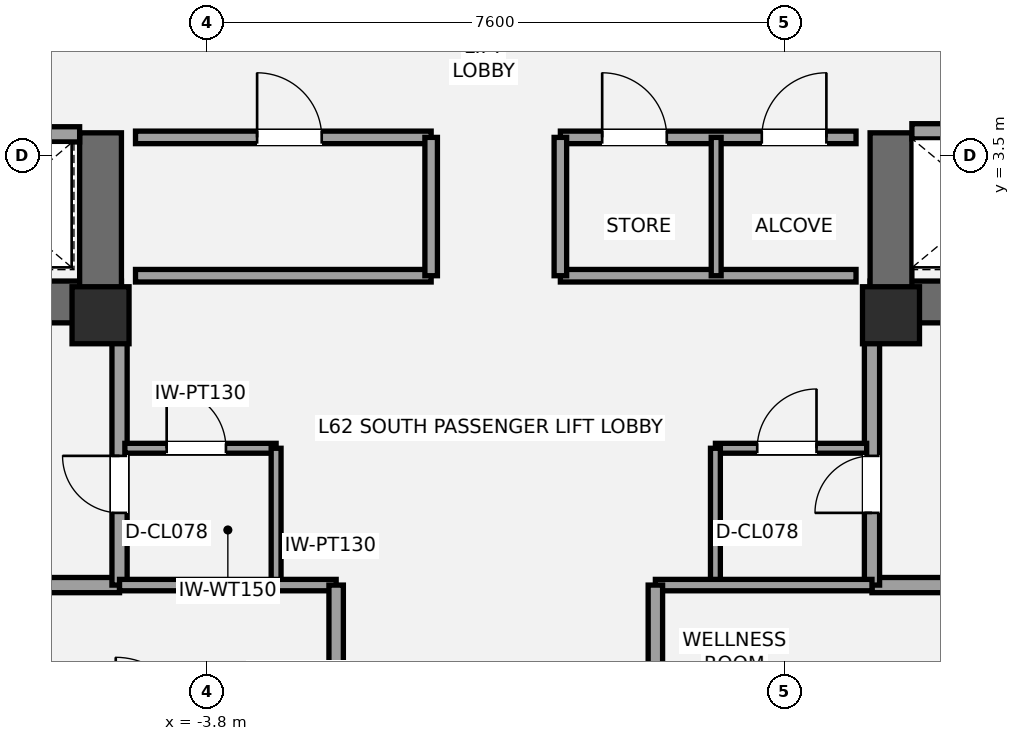
"""IFC4 building model, lengths in metres.
Left out: names, types, materials, properties, quantities, classifications, styles, units other than length and angle.
Written with IfcOpenShell. Run it as: python <this file> out.ifc"""

import sys

from ifc_helpers import new_model, si_unit, direction, frame, frame_2d, origin, origin_2d, place, context, subcontext, project, spatial, rectangle, extrude, element, fill, save


model = new_model("IFC4")
c1 = context("Model", 3, precision=1e-05, world=origin(), true_north=direction((0.0, 1.0)))
c2 = subcontext(c1, "Body", "Model", "MODEL_VIEW")
j1 = project(units=[si_unit("LENGTHUNIT", "METRE"), si_unit("PLANEANGLEUNIT", "RADIAN")], contexts=[c1])
p1 = place(None, origin())
s1 = spatial("IfcSite", under=j1, at=p1, CompositionType="ELEMENT")
p2 = place(p1, origin())
s2 = spatial("IfcBuilding", under=s1, at=p2, CompositionType="ELEMENT")
p3 = place(p2, frame((0.0, 0.0, 222.6)))
s3 = spatial("IfcBuildingStorey", under=s2, at=p3, CompositionType="ELEMENT", Elevation=222.6)
p4 = place(p3, frame((-4.925, 1.575, 0.0), z_axis=(0.0, 0.0, 1.0), x_axis=(-1.0, 0.0, 0.0)))
e1 = element("IfcWall", 1, at=p4, inside=s3, PredefinedType="SHEAR", context=c2, shape_type="SweptSolid", body=[
    extrude(rectangle(XDim=8.775, YDim=0.55, at=frame_2d((4.387, 0.0))), origin(), (0.0, 0.0, 1.0), 3.15),
])
p5 = place(p4, frame((5.375, 0.0, 0.0)))
e2 = element("IfcOpeningElement", 2, at=p5, cuts=e1, PredefinedType="OPENING", context=c2, shape_type="SweptSolid", body=[
    extrude(rectangle(XDim=1.05, YDim=2.15, at=frame_2d((0.525, 1.075))), frame((0.0, 0.285, 0.0), z_axis=(0.0, -1.0, 0.0), x_axis=(1.0, 0.0, 0.0)), (0.0, 0.0, 1.0), 0.57),
])
p6 = place(p4, frame((3.705, 0.0, 0.0)))
e3 = element("IfcOpeningElement", 3, at=p6, cuts=e1, PredefinedType="OPENING", context=c2, shape_type="SweptSolid", body=[
    extrude(rectangle(XDim=1.1, YDim=2.2, at=frame_2d((0.55, 1.1))), frame((0.0, 0.285, 0.0), z_axis=(0.0, -1.0, 0.0), x_axis=(1.0, 0.0, 0.0)), (0.0, 0.0, 1.0), 0.57),
])
p7 = place(p3, frame((-5.2, 1.3, 0.0), z_axis=(0.0, 0.0, 1.0), x_axis=(0.0, 1.0, 0.0)))
e4 = element("IfcWall", 4, at=p7, inside=s3, PredefinedType="SHEAR", context=c2, shape_type="SweptSolid", body=[
    extrude(rectangle(XDim=2.5, YDim=0.55, at=frame_2d((1.25, 0.0))), origin(), (0.0, 0.0, 1.0), 3.15),
])
p8 = place(p3, frame((13.7, 1.575, 0.0), z_axis=(0.0, 0.0, 1.0), x_axis=(-1.0, 0.0, 0.0)))
e5 = element("IfcWall", 5, at=p8, inside=s3, PredefinedType="SHEAR", context=c2, shape_type="SweptSolid", body=[
    extrude(rectangle(XDim=8.775, YDim=0.55, at=frame_2d((4.387, 0.0))), origin(), (0.0, 0.0, 1.0), 3.15),
])
p9 = place(p8, frame((2.35, 0.0, 0.0)))
e6 = element("IfcOpeningElement", 6, at=p9, cuts=e5, PredefinedType="OPENING", context=c2, shape_type="SweptSolid", body=[
    extrude(rectangle(XDim=1.05, YDim=2.15, at=frame_2d((0.525, 1.075))), frame((0.0, 0.285, 0.0), z_axis=(0.0, -1.0, 0.0), x_axis=(1.0, 0.0, 0.0)), (0.0, 0.0, 1.0), 0.57),
])
p10 = place(p8, frame((4.35, 0.0, 0.0)))
e7 = element("IfcOpeningElement", 7, at=p10, cuts=e5, PredefinedType="OPENING", context=c2, shape_type="SweptSolid", body=[
    extrude(rectangle(XDim=1.1, YDim=2.2, at=frame_2d((0.55, 1.1))), frame((0.0, 0.285, 0.0), z_axis=(0.0, -1.0, 0.0), x_axis=(1.0, 0.0, 0.0)), (0.0, 0.0, 1.0), 0.57),
])
p11 = place(p3, frame((5.2, 1.3, 0.0), z_axis=(0.0, 0.0, 1.0), x_axis=(0.0, 1.0, 0.0)))
e8 = element("IfcWall", 8, at=p11, inside=s3, PredefinedType="SHEAR", context=c2, shape_type="SweptSolid", body=[
    extrude(rectangle(XDim=2.5, YDim=0.55, at=frame_2d((1.25, 0.0))), origin(), (0.0, 0.0, 1.0), 3.15),
])
for number, where, z_axis, x_axis in (
    (9, (-5.2, 1.4, 0.0), (0.0, 0.0, 1.0), (1.0, 0.0, 0.0)),
    (10, (5.2, 1.4, 0.0), (0.0, 0.0, 1.0), (1.0, 0.0, 0.0)),
):
    element("IfcColumn", number, at=place(p3, frame(where, z_axis=z_axis, x_axis=x_axis)), inside=s3, PredefinedType="PILASTER", context=c2, shape_type="SweptSolid", body=[
        extrude(rectangle(XDim=0.75, YDim=0.75, at=origin_2d()), origin(), (0.0, 0.0, 1.0), 3.15),
    ])
p12 = place(p3, frame((-7.2, -2.15, 0.0), z_axis=(0.0, 0.0, 1.0), x_axis=(1.0, 0.0, 0.0)))
e11 = element("IfcWall", 11, at=p12, inside=s3, PredefinedType="SOLIDWALL", context=c2, shape_type="SweptSolid", body=[
    extrude(rectangle(XDim=2.25, YDim=0.2, at=frame_2d((1.125, 0.0))), origin(), (0.0, 0.0, 1.0), 2.97),
])
p13 = place(p3, frame((-4.95, -2.15, 0.0), z_axis=(0.0, 0.0, 1.0), x_axis=(0.0, 1.0, 0.0)))
e12 = element("IfcWall", 12, at=p13, inside=s3, PredefinedType="SOLIDWALL", context=c2, shape_type="SweptSolid", body=[
    extrude(rectangle(XDim=3.5, YDim=0.2, at=frame_2d((1.75, 0.0))), origin(), (0.0, 0.0, 1.0), 2.423),
])
p14 = place(p13, frame((0.95, 0.0, 0.0)))
e13 = element("IfcOpeningElement", 13, at=p14, cuts=e12, PredefinedType="OPENING", context=c2, shape_type="SweptSolid", body=[
    extrude(rectangle(XDim=0.75, YDim=2.1, at=frame_2d((0.375, 1.05))), frame((0.0, 0.11, 0.0), z_axis=(0.0, -1.0, 0.0), x_axis=(1.0, 0.0, 0.0)), (0.0, 0.0, 1.0), 0.22),
])
p15 = place(p3, frame((4.95, -2.15, 0.0), z_axis=(0.0, 0.0, 1.0), x_axis=(1.0, 0.0, 0.0)))
e14 = element("IfcWall", 14, at=p15, inside=s3, PredefinedType="SOLIDWALL", context=c2, shape_type="SweptSolid", body=[
    extrude(rectangle(XDim=2.25, YDim=0.2, at=frame_2d((1.125, 0.0))), origin(), (0.0, 0.0, 1.0), 2.97),
])
p16 = place(p3, frame((4.95, -2.15, 0.0), z_axis=(0.0, 0.0, 1.0), x_axis=(0.0, 1.0, 0.0)))
e15 = element("IfcWall", 15, at=p16, inside=s3, PredefinedType="SOLIDWALL", context=c2, shape_type="SweptSolid", body=[
    extrude(rectangle(XDim=3.5, YDim=0.2, at=frame_2d((1.75, 0.0))), origin(), (0.0, 0.0, 1.0), 2.423),
])
p17 = place(p16, frame((0.95, 0.0, 0.0)))
e16 = element("IfcOpeningElement", 16, at=p17, cuts=e15, PredefinedType="OPENING", context=c2, shape_type="SweptSolid", body=[
    extrude(rectangle(XDim=0.75, YDim=2.1, at=frame_2d((0.375, 1.05))), frame((0.0, 0.11, 0.0), z_axis=(0.0, -1.0, 0.0), x_axis=(1.0, 0.0, 0.0)), (0.0, 0.0, 1.0), 0.22),
])
p18 = place(p3, frame((-4.88, -0.35, 0.0), z_axis=(0.0, 0.0, 1.0), x_axis=(1.0, 0.0, 0.0)))
e17 = element("IfcWall", 17, at=p18, inside=s3, PredefinedType="PARTITIONING", context=c2, shape_type="SweptSolid", body=[
    extrude(rectangle(XDim=1.99, YDim=0.13, at=frame_2d((0.995, 0.0))), origin(), (0.0, 0.0, 1.0), 2.97),
])
p19 = place(p18, frame((0.55, 0.0, 0.0)))
e18 = element("IfcOpeningElement", 18, at=p19, cuts=e17, PredefinedType="OPENING", context=c2, shape_type="SweptSolid", body=[
    extrude(rectangle(XDim=0.78, YDim=2.1, at=frame_2d((0.39, 1.05))), frame((0.0, 0.075, 0.0), z_axis=(0.0, -1.0, 0.0), x_axis=(1.0, 0.0, 0.0)), (0.0, 0.0, 1.0), 0.15),
])
p20 = place(p3, frame((-2.89, -2.15, 0.0), z_axis=(0.0, 0.0, 1.0), x_axis=(0.0, 1.0, 0.0)))
e19 = element("IfcWall", 19, at=p20, inside=s3, PredefinedType="PARTITIONING", context=c2, shape_type="SweptSolid", body=[
    extrude(rectangle(XDim=1.8, YDim=0.13, at=frame_2d((0.9, 0.0))), origin(), (0.0, 0.0, 1.0), 2.423),
])
p21 = place(p3, frame((2.89, -0.35, 0.0), z_axis=(0.0, 0.0, 1.0), x_axis=(1.0, 0.0, 0.0)))
e20 = element("IfcWall", 20, at=p21, inside=s3, PredefinedType="PARTITIONING", context=c2, shape_type="SweptSolid", body=[
    extrude(rectangle(XDim=1.99, YDim=0.13, at=frame_2d((0.995, 0.0))), origin(), (0.0, 0.0, 1.0), 2.423),
])
p22 = place(p21, frame((0.55, 0.0, 0.0)))
e21 = element("IfcOpeningElement", 21, at=p22, cuts=e20, PredefinedType="OPENING", context=c2, shape_type="SweptSolid", body=[
    extrude(rectangle(XDim=0.78, YDim=2.1, at=frame_2d((0.39, 1.05))), frame((0.0, 0.075, 0.0), z_axis=(0.0, -1.0, 0.0), x_axis=(1.0, 0.0, 0.0)), (0.0, 0.0, 1.0), 0.15),
])
p23 = place(p3, frame((2.89, -2.15, 0.0), z_axis=(0.0, 0.0, 1.0), x_axis=(0.0, 1.0, 0.0)))
e22 = element("IfcWall", 22, at=p23, inside=s3, PredefinedType="PARTITIONING", context=c2, shape_type="SweptSolid", body=[
    extrude(rectangle(XDim=1.8, YDim=0.13, at=frame_2d((0.9, 0.0))), origin(), (0.0, 0.0, 1.0), 2.97),
])
p24 = place(p3, frame((-9.78, 3.78, 0.0), z_axis=(0.0, 0.0, 1.0), x_axis=(1.0, 0.0, 0.0)))
e23 = element("IfcWall", 23, at=p24, inside=s3, PredefinedType="SOLIDWALL", context=c2, shape_type="SweptSolid", body=[
    extrude(rectangle(XDim=4.305, YDim=0.2, at=frame_2d((2.152, 0.0))), origin(), (0.0, 0.0, 1.0), 2.97),
])
p25 = place(p24, frame((2.72, 0.0, 0.0)))
e24 = element("IfcOpeningElement", 24, at=p25, cuts=e23, PredefinedType="OPENING", context=c2, shape_type="SweptSolid", body=[
    extrude(rectangle(XDim=1.1, YDim=2.2, at=frame_2d((0.55, 1.1))), frame((0.0, 0.11, 0.0), z_axis=(0.0, -1.0, 0.0), x_axis=(1.0, 0.0, 0.0)), (0.0, 0.0, 1.0), 0.22),
])
p26 = place(p3, frame((5.475, 3.82, 0.0), z_axis=(0.0, 0.0, 1.0), x_axis=(1.0, 0.0, 0.0)))
e25 = element("IfcWall", 25, at=p26, inside=s3, PredefinedType="SOLIDWALL", context=c2, shape_type="SweptSolid", body=[
    extrude(rectangle(XDim=4.305, YDim=0.2, at=frame_2d((2.152, 0.0))), origin(), (0.0, 0.0, 1.0), 2.97),
])
p27 = place(p26, frame((0.65, 0.0, 0.0)))
e26 = element("IfcOpeningElement", 26, at=p27, cuts=e25, PredefinedType="OPENING", context=c2, shape_type="SweptSolid", body=[
    extrude(rectangle(XDim=1.2, YDim=2.2, at=frame_2d((0.6, 1.1))), frame((0.0, 0.11, 0.0), z_axis=(0.0, -1.0, 0.0), x_axis=(1.0, 0.0, 0.0)), (0.0, 0.0, 1.0), 0.22),
])
p28 = place(p3, frame((-4.74, 1.92, 0.0), z_axis=(0.0, 0.0, 1.0), x_axis=(1.0, 0.0, 0.0)))
e27 = element("IfcWall", 27, at=p28, inside=s3, PredefinedType="PARTITIONING", context=c2, shape_type="SweptSolid", body=[
    extrude(rectangle(XDim=3.89, YDim=0.165, at=frame_2d((1.945, 0.0))), origin(), (0.0, 0.0, 1.0), 2.11),
])
p29 = place(p3, frame((-4.74, 3.74, 0.0), z_axis=(0.0, 0.0, 1.0), x_axis=(1.0, 0.0, 0.0)))
e28 = element("IfcWall", 28, at=p29, inside=s3, PredefinedType="PARTITIONING", context=c2, shape_type="SweptSolid", body=[
    extrude(rectangle(XDim=3.89, YDim=0.165, at=frame_2d((1.945, 0.0))), origin(), (0.0, 0.0, 1.0), 2.97),
])
p30 = place(p29, frame((1.6, 0.0, 0.0)))
e29 = element("IfcOpeningElement", 29, at=p30, cuts=e28, PredefinedType="OPENING", context=c2, shape_type="SweptSolid", body=[
    extrude(rectangle(XDim=0.85, YDim=2.1, at=frame_2d((0.425, 1.05))), frame((0.0, 0.093, 0.0), z_axis=(0.0, -1.0, 0.0), x_axis=(1.0, 0.0, 0.0)), (0.0, 0.0, 1.0), 0.185),
])
p31 = place(p3, frame((-0.85, 1.92, 0.0), z_axis=(0.0, 0.0, 1.0), x_axis=(0.0, 1.0, 0.0)))
e30 = element("IfcWall", 30, at=p31, inside=s3, PredefinedType="PARTITIONING", context=c2, shape_type="SweptSolid", body=[
    extrude(rectangle(XDim=1.82, YDim=0.165, at=frame_2d((0.91, 0.0))), origin(), (0.0, 0.0, 1.0), 2.97),
])
p32 = place(p3, frame((0.85, 1.92, 0.0), z_axis=(0.0, 0.0, 1.0), x_axis=(1.0, 0.0, 0.0)))
e31 = element("IfcWall", 31, at=p32, inside=s3, PredefinedType="PARTITIONING", context=c2, shape_type="SweptSolid", body=[
    extrude(rectangle(XDim=3.89, YDim=0.165, at=frame_2d((1.945, 0.0))), origin(), (0.0, 0.0, 1.0), 2.11),
])
p33 = place(p3, frame((0.85, 3.74, 0.0), z_axis=(0.0, 0.0, 1.0), x_axis=(1.0, 0.0, 0.0)))
e32 = element("IfcWall", 32, at=p33, inside=s3, PredefinedType="PARTITIONING", context=c2, shape_type="SweptSolid", body=[
    extrude(rectangle(XDim=3.89, YDim=0.165, at=frame_2d((1.945, 0.0))), origin(), (0.0, 0.0, 1.0), 2.97),
])
p34 = place(p33, frame((0.55, 0.0, 0.0)))
e33 = element("IfcOpeningElement", 33, at=p34, cuts=e32, PredefinedType="OPENING", context=c2, shape_type="SweptSolid", body=[
    extrude(rectangle(XDim=0.85, YDim=2.1, at=frame_2d((0.425, 1.05))), frame((0.0, 0.093, 0.0), z_axis=(0.0, -1.0, 0.0), x_axis=(1.0, 0.0, 0.0)), (0.0, 0.0, 1.0), 0.185),
])
p35 = place(p33, frame((2.65, 0.0, 0.0)))
e34 = element("IfcOpeningElement", 34, at=p35, cuts=e32, PredefinedType="OPENING", context=c2, shape_type="SweptSolid", body=[
    extrude(rectangle(XDim=0.85, YDim=2.1, at=frame_2d((0.425, 1.05))), frame((0.0, 0.093, 0.0), z_axis=(0.0, -1.0, 0.0), x_axis=(1.0, 0.0, 0.0)), (0.0, 0.0, 1.0), 0.185),
])
p36 = place(p3, frame((0.85, 1.92, 0.0), z_axis=(0.0, 0.0, 1.0), x_axis=(0.0, 1.0, 0.0)))
e35 = element("IfcWall", 35, at=p36, inside=s3, PredefinedType="PARTITIONING", context=c2, shape_type="SweptSolid", body=[
    extrude(rectangle(XDim=1.82, YDim=0.165, at=frame_2d((0.91, 0.0))), origin(), (0.0, 0.0, 1.0), 2.97),
])
p37 = place(p3, frame((2.9, 1.92, 0.0), z_axis=(0.0, 0.0, 1.0), x_axis=(0.0, 1.0, 0.0)))
e36 = element("IfcWall", 36, at=p37, inside=s3, PredefinedType="PARTITIONING", context=c2, shape_type="SweptSolid", body=[
    extrude(rectangle(XDim=1.82, YDim=0.13, at=frame_2d((0.91, 0.0))), origin(), (0.0, 0.0, 1.0), 2.97),
])
p38 = place(p3, frame((-4.95, -2.15, 0.0), z_axis=(0.0, 0.0, 1.0), x_axis=(1.0, 0.0, 0.0)))
e37 = element("IfcWall", 37, at=p38, inside=s3, PredefinedType="PLUMBINGWALL", context=c2, shape_type="SweptSolid", body=[
    extrude(rectangle(XDim=2.85, YDim=0.15, at=frame_2d((1.425, 0.0))), origin(), (0.0, 0.0, 1.0), 2.97),
])
p39 = place(p3, frame((-2.1, -4.05, 0.0), z_axis=(0.0, 0.0, 1.0), x_axis=(0.0, 1.0, 0.0)))
e38 = element("IfcWall", 38, at=p39, inside=s3, PredefinedType="PLUMBINGWALL", context=c2, shape_type="SweptSolid", body=[
    extrude(rectangle(XDim=1.9, YDim=0.19, at=frame_2d((0.95, 0.0))), origin(), (0.0, 0.0, 1.0), 2.423),
])
p40 = place(p3, frame((2.1, -2.15, 0.0), z_axis=(0.0, 0.0, 1.0), x_axis=(1.0, 0.0, 0.0)))
e39 = element("IfcWall", 39, at=p40, inside=s3, PredefinedType="PLUMBINGWALL", context=c2, shape_type="SweptSolid", body=[
    extrude(rectangle(XDim=2.85, YDim=0.15, at=frame_2d((1.425, 0.0))), origin(), (0.0, 0.0, 1.0), 2.97),
])
p41 = place(p3, frame((2.1, -4.05, 0.0), z_axis=(0.0, 0.0, 1.0), x_axis=(0.0, 1.0, 0.0)))
e40 = element("IfcWall", 40, at=p41, inside=s3, PredefinedType="PLUMBINGWALL", context=c2, shape_type="SweptSolid", body=[
    extrude(rectangle(XDim=1.9, YDim=0.19, at=frame_2d((0.95, 0.0))), origin(), (0.0, 0.0, 1.0), 2.97),
])
p42 = place(p14, origin())
e41 = element("IfcDoor", 41, at=p42, inside=s3, OperationType="SINGLE_SWING_RIGHT", PredefinedType="DOOR", context=c2, shape_type="SweptSolid", body=[
    extrude(rectangle(XDim=0.75, YDim=2.1, at=frame_2d((0.375, 1.05))), frame((0.0, 0.025, 0.0), z_axis=(0.0, -1.0, 0.0), x_axis=(1.0, 0.0, 0.0)), (0.0, 0.0, 1.0), 0.05),
])
fill(e13, e41)
p43 = place(p17, origin())
e42 = element("IfcDoor", 42, at=p43, inside=s3, OperationType="SINGLE_SWING_LEFT", PredefinedType="DOOR", context=c2, shape_type="SweptSolid", body=[
    extrude(rectangle(XDim=0.75, YDim=2.1, at=frame_2d((0.375, 1.05))), frame((0.0, 0.025, 0.0), z_axis=(0.0, -1.0, 0.0), x_axis=(1.0, 0.0, 0.0)), (0.0, 0.0, 1.0), 0.05),
])
fill(e16, e42)
p44 = place(p19, origin())
e43 = element("IfcDoor", 43, at=p44, inside=s3, OperationType="SINGLE_SWING_LEFT", PredefinedType="DOOR", context=c2, shape_type="SweptSolid", body=[
    extrude(rectangle(XDim=0.78, YDim=2.1, at=frame_2d((0.39, 1.05))), frame((0.0, 0.025, 0.0), z_axis=(0.0, -1.0, 0.0), x_axis=(1.0, 0.0, 0.0)), (0.0, 0.0, 1.0), 0.05),
])
fill(e18, e43)
p45 = place(p22, origin())
e44 = element("IfcDoor", 44, at=p45, inside=s3, OperationType="SINGLE_SWING_RIGHT", PredefinedType="DOOR", context=c2, shape_type="SweptSolid", body=[
    extrude(rectangle(XDim=0.78, YDim=2.1, at=frame_2d((0.39, 1.05))), frame((0.0, 0.025, 0.0), z_axis=(0.0, -1.0, 0.0), x_axis=(1.0, 0.0, 0.0)), (0.0, 0.0, 1.0), 0.05),
])
fill(e21, e44)
p46 = place(p30, origin())
e45 = element("IfcDoor", 45, at=p46, inside=s3, OperationType="SINGLE_SWING_LEFT", PredefinedType="DOOR", context=c2, shape_type="SweptSolid", body=[
    extrude(rectangle(XDim=0.85, YDim=2.1, at=frame_2d((0.425, 1.05))), frame((0.0, 0.025, 0.0), z_axis=(0.0, -1.0, 0.0), x_axis=(1.0, 0.0, 0.0)), (0.0, 0.0, 1.0), 0.05),
])
fill(e29, e45)
p47 = place(p34, origin())
e46 = element("IfcDoor", 46, at=p47, inside=s3, OperationType="SINGLE_SWING_LEFT", PredefinedType="DOOR", context=c2, shape_type="SweptSolid", body=[
    extrude(rectangle(XDim=0.85, YDim=2.1, at=frame_2d((0.425, 1.05))), frame((0.0, 0.025, 0.0), z_axis=(0.0, -1.0, 0.0), x_axis=(1.0, 0.0, 0.0)), (0.0, 0.0, 1.0), 0.05),
])
fill(e33, e46)
p48 = place(p35, origin())
e47 = element("IfcDoor", 47, at=p48, inside=s3, OperationType="SINGLE_SWING_RIGHT", PredefinedType="DOOR", context=c2, shape_type="SweptSolid", body=[
    extrude(rectangle(XDim=0.85, YDim=2.1, at=frame_2d((0.425, 1.05))), frame((0.0, 0.025, 0.0), z_axis=(0.0, -1.0, 0.0), x_axis=(1.0, 0.0, 0.0)), (0.0, 0.0, 1.0), 0.05),
])
fill(e34, e47)
save(model, sys.argv[1])
